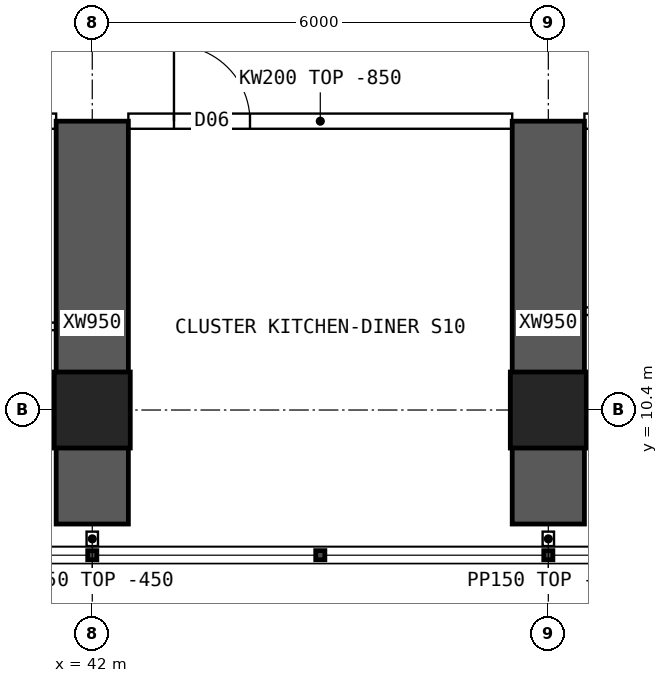
"""IFC4 building model, lengths in metres.
Left out: names, types, materials, properties, quantities, classifications, styles, units other than length and angle.
Written with IfcOpenShell. Run it as: python <this file> out.ifc"""

import sys

from ifc_helpers import new_model, si_unit, direction, frame, frame_2d, origin, origin_2d, place, context, subcontext, project, spatial, polyline, rectangle, hollow_rectangle, outline, extrude, element, fill, save


model = new_model("IFC4")
c1 = context("Model", 3, precision=1e-05, world=origin(), true_north=direction((0.0, 1.0)))
c2 = subcontext(c1, "Body", "Model", "MODEL_VIEW")
j1 = project(units=[si_unit("LENGTHUNIT", "METRE"), si_unit("PLANEANGLEUNIT", "RADIAN")], contexts=[c1])
p1 = place(None, origin())
s1 = spatial("IfcSite", under=j1, at=p1, CompositionType="ELEMENT")
p2 = place(p1, origin())
s2 = spatial("IfcBuilding", under=s1, at=p2, CompositionType="ELEMENT")
p3 = place(p2, frame((0.0, 0.0, 80.65)))
s3 = spatial("IfcBuildingStorey", under=s2, at=p3, CompositionType="ELEMENT", Elevation=80.65)
for number, where, z_axis, x_axis in (
    (1, (42.0, 10.4, 0.0), (0.0, 0.0, 1.0), (1.0, 0.0, 0.0)),
    (2, (48.0, 10.4, 0.0), (0.0, 0.0, 1.0), (1.0, 0.0, 0.0)),
):
    element("IfcColumn", number, at=place(p3, frame(where, z_axis=z_axis, x_axis=x_axis)), inside=s3, PredefinedType="COLUMN", context=c2, shape_type="SweptSolid", body=[
        extrude(hollow_rectangle(XDim=1.0, YDim=1.0, WallThickness=0.1, at=origin_2d()), origin(), (0.0, 0.0, 1.0), 3.75),
    ])
for number, where, z_axis, x_axis in (
    (3, (42.0, 8.9, 0.0), (0.0, 0.0, 1.0), (0.0, 1.0, 0.0)),
    (4, (48.0, 8.9, 0.0), (0.0, 0.0, 1.0), (0.0, 1.0, 0.0)),
):
    element("IfcWall", number, at=place(p3, frame(where, z_axis=z_axis, x_axis=x_axis)), inside=s3, PredefinedType="SHEAR", context=c2, shape_type="SweptSolid", body=[
        extrude(rectangle(XDim=5.3, YDim=0.95, at=frame_2d((2.65, 0.0))), origin(), (0.0, 0.0, 1.0), 3.75),
    ])
p4 = place(p3, frame((36.475, 14.2, 0.0), z_axis=(0.0, 0.0, 1.0), x_axis=(1.0, 0.0, 0.0)))
e5 = element("IfcWall", 5, at=p4, inside=s3, PredefinedType="SOLIDWALL", context=c2, shape_type="SweptSolid", body=[
    extrude(outline(polyline([(0.0, 0.0), (5.05, 0.0), (5.05, 2.9), (0.0, 2.9), (0.0, 0.0)])), frame((0.0, 0.1, 0.0), z_axis=(0.0, -1.0, 0.0), x_axis=(1.0, 0.0, 0.0)), (0.0, 0.0, 1.0), 0.2),
])
p5 = place(p4, frame((0.3, 0.0, 0.0)))
e6 = element("IfcOpeningElement", 6, at=p5, cuts=e5, PredefinedType="OPENING", context=c2, shape_type="SweptSolid", body=[
    extrude(rectangle(XDim=1.0, YDim=2.1, at=frame_2d((0.5, 1.05))), frame((0.0, 0.11, 0.0), z_axis=(0.0, -1.0, 0.0), x_axis=(1.0, 0.0, 0.0)), (0.0, 0.0, 1.0), 0.22),
])
p6 = place(p3, frame((42.475, 14.2, 0.0), z_axis=(0.0, 0.0, 1.0), x_axis=(1.0, 0.0, 0.0)))
e7 = element("IfcWall", 7, at=p6, inside=s3, PredefinedType="SOLIDWALL", context=c2, shape_type="SweptSolid", body=[
    extrude(outline(polyline([(0.0, 0.0), (5.05, 0.0), (5.05, 2.9), (0.0, 2.9), (0.0, 0.0)])), frame((0.0, 0.1, 0.0), z_axis=(0.0, -1.0, 0.0), x_axis=(1.0, 0.0, 0.0)), (0.0, 0.0, 1.0), 0.2),
])
p7 = place(p6, frame((0.6, 0.0, 0.0)))
e8 = element("IfcOpeningElement", 8, at=p7, cuts=e7, PredefinedType="OPENING", context=c2, shape_type="SweptSolid", body=[
    extrude(rectangle(XDim=1.0, YDim=2.1, at=frame_2d((0.5, 1.05))), frame((0.0, 0.11, 0.0), z_axis=(0.0, -1.0, 0.0), x_axis=(1.0, 0.0, 0.0)), (0.0, 0.0, 1.0), 0.22),
])
p8 = place(p3, frame((48.475, 14.2, 0.0), z_axis=(0.0, 0.0, 1.0), x_axis=(1.0, 0.0, 0.0)))
e9 = element("IfcWall", 9, at=p8, inside=s3, PredefinedType="SOLIDWALL", context=c2, shape_type="SweptSolid", body=[
    extrude(outline(polyline([(0.0, 0.0), (5.05, 0.0), (5.05, 2.9), (0.0, 2.9), (0.0, 0.0)])), frame((0.0, 0.1, 0.0), z_axis=(0.0, -1.0, 0.0), x_axis=(1.0, 0.0, 0.0)), (0.0, 0.0, 1.0), 0.2),
])
p9 = place(p8, frame((1.45, 0.0, 0.0)))
e10 = element("IfcOpeningElement", 10, at=p9, cuts=e9, PredefinedType="OPENING", context=c2, shape_type="SweptSolid", body=[
    extrude(rectangle(XDim=0.9, YDim=2.1, at=frame_2d((0.45, 1.05))), frame((0.0, 0.11, 0.0), z_axis=(0.0, -1.0, 0.0), x_axis=(1.0, 0.0, 0.0)), (0.0, 0.0, 1.0), 0.22),
])
p10 = place(p8, frame((2.7, 0.0, 0.0)))
e11 = element("IfcOpeningElement", 11, at=p10, cuts=e9, PredefinedType="OPENING", context=c2, shape_type="SweptSolid", body=[
    extrude(rectangle(XDim=0.9, YDim=2.1, at=frame_2d((0.45, 1.05))), frame((0.0, 0.11, 0.0), z_axis=(0.0, -1.0, 0.0), x_axis=(1.0, 0.0, 0.0)), (0.0, 0.0, 1.0), 0.22),
])
p11 = place(p3, frame((38.875, 11.5, 0.0), z_axis=(0.0, 0.0, 1.0), x_axis=(1.0, 0.0, 0.0)))
e12 = element("IfcWall", 12, at=p11, inside=s3, PredefinedType="PARTITIONING", context=c2, shape_type="SweptSolid", body=[
    extrude(rectangle(XDim=2.65, YDim=0.1, at=frame_2d((1.325, 0.0))), origin(), (0.0, 0.0, 1.0), 3.3),
])
p12 = place(p3, frame((49.875, 11.7, 0.0), z_axis=(0.0, 0.0, 1.0), x_axis=(-1.0, 0.0, 0.0)))
e13 = element("IfcWall", 13, at=p12, inside=s3, PredefinedType="PARTITIONING", context=c2, shape_type="SweptSolid", body=[
    extrude(rectangle(XDim=1.4, YDim=0.1, at=frame_2d((0.7, 0.0))), origin(), (0.0, 0.0, 1.0), 3.3),
])
p13 = place(p12, frame((0.25, 0.0, 0.0)))
e14 = element("IfcOpeningElement", 14, at=p13, cuts=e13, PredefinedType="OPENING", context=c2, shape_type="SweptSolid", body=[
    extrude(rectangle(XDim=0.9, YDim=2.1, at=frame_2d((0.45, 1.05))), frame((0.0, 0.06, 0.0), z_axis=(0.0, -1.0, 0.0), x_axis=(1.0, 0.0, 0.0)), (0.0, 0.0, 1.0), 0.12),
])
for number, where, z_axis, x_axis in (
    (15, (42.0, 8.8, 0.0), (0.0, 0.0, 1.0), (0.0, -1.0, 0.0)),
    (16, (48.0, 8.8, 0.0), (0.0, 0.0, 1.0), (0.0, -1.0, 0.0)),
):
    element("IfcWall", number, at=place(p3, frame(where, z_axis=z_axis, x_axis=x_axis)), inside=s3, PredefinedType="PARTITIONING", context=c2, shape_type="SweptSolid", body=[
        extrude(rectangle(XDim=0.19, YDim=0.15, at=frame_2d((0.095, 0.0))), origin(), (0.0, 0.0, 1.0), 3.3),
    ])
p14 = place(p7, origin())
e17 = element("IfcDoor", 17, at=p14, inside=s3, OperationType="SINGLE_SWING_LEFT", PredefinedType="DOOR", context=c2, shape_type="SweptSolid", body=[
    extrude(rectangle(XDim=1.0, YDim=2.1, at=frame_2d((0.5, 1.05))), frame((0.0, 0.025, 0.0), z_axis=(0.0, -1.0, 0.0), x_axis=(1.0, 0.0, 0.0)), (0.0, 0.0, 1.0), 0.05),
])
fill(e8, e17)
save(model, sys.argv[1])
